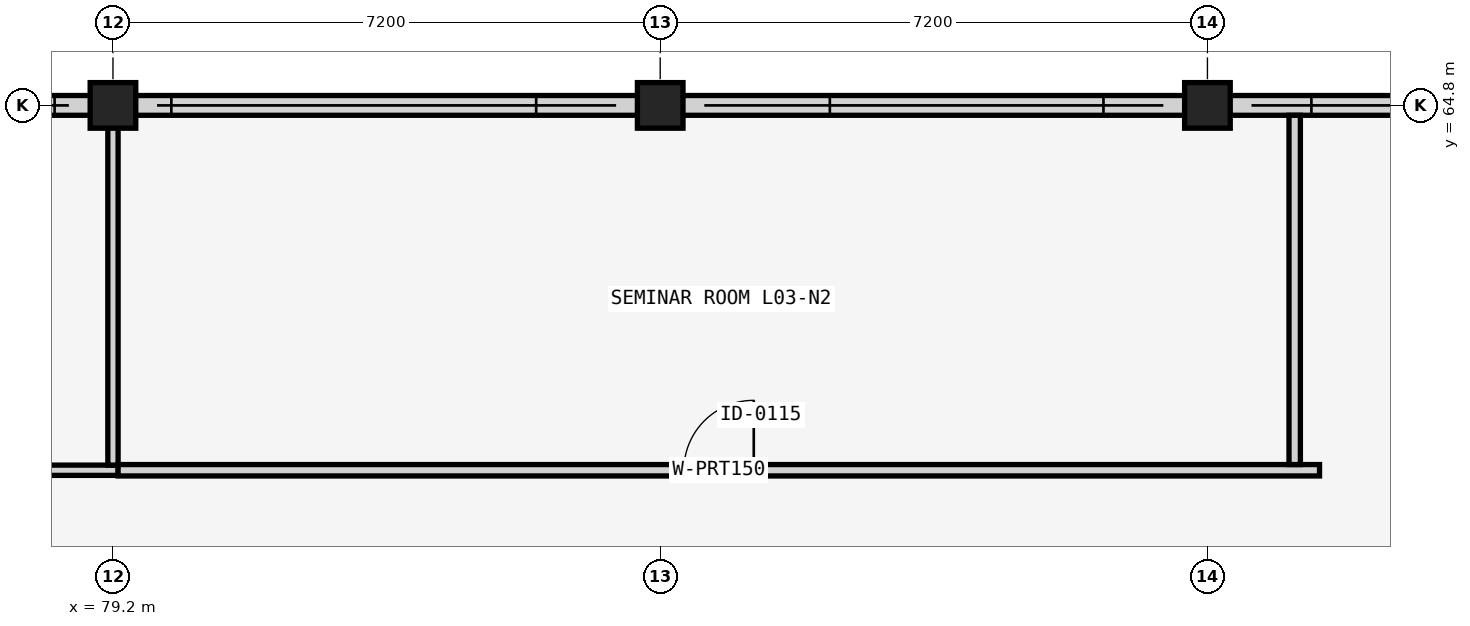
"""IFC4 building model, lengths in metres.
Left out: names, types, materials, properties, quantities, classifications, styles, units other than length and angle.
Written with IfcOpenShell. Run it as: python <this file> out.ifc"""

import sys

from ifc_helpers import new_model, si_unit, direction, frame, frame_2d, origin, origin_2d, place, context, subcontext, project, spatial, rectangle, extrude, element, fill, save


model = new_model("IFC4")
c1 = context("Model", 3, precision=1e-05, world=origin(), true_north=direction((0.0, 1.0)))
c2 = subcontext(c1, "Body", "Model", "MODEL_VIEW")
j1 = project(units=[si_unit("LENGTHUNIT", "METRE"), si_unit("PLANEANGLEUNIT", "RADIAN")], contexts=[c1])
p1 = place(None, origin())
s1 = spatial("IfcSite", under=j1, at=p1, CompositionType="ELEMENT")
p2 = place(p1, origin())
s2 = spatial("IfcBuilding", under=s1, at=p2, CompositionType="ELEMENT")
p3 = place(p2, frame((0.0, 0.0, 13.12)))
s3 = spatial("IfcBuildingStorey", under=s2, at=p3, CompositionType="ELEMENT", Elevation=13.12)
for number, where, z_axis, x_axis in (
    (1, (79.2, 64.8, 0.0), (0.0, 0.0, 1.0), (1.0, 0.0, 0.0)),
    (2, (86.4, 64.8, 0.0), (0.0, 0.0, 1.0), (1.0, 0.0, 0.0)),
    (3, (93.6, 64.8, 0.0), (0.0, 0.0, 1.0), (1.0, 0.0, 0.0)),
):
    element("IfcColumn", number, at=place(p3, frame(where, z_axis=z_axis, x_axis=x_axis)), inside=s3, PredefinedType="COLUMN", context=c2, shape_type="SweptSolid", body=[
        extrude(rectangle(XDim=0.6, YDim=0.6, at=origin_2d()), origin(), (0.0, 0.0, 1.0), 4.16),
    ])
p4 = place(p3, frame((72.0, 64.8, 4.16), z_axis=(0.0, 0.0, 1.0), x_axis=(1.0, 0.0, 0.0)))
e4 = element("IfcWall", 4, at=p4, inside=s3, PredefinedType="SOLIDWALL", context=c2, shape_type="SweptSolid", body=[
    extrude(rectangle(XDim=14.4, YDim=0.26, at=frame_2d((7.2, 0.0))), origin(), (0.0, 0.0, 1.0), 3.99),
])
p5 = place(p4, frame((1.632, 0.0, 0.4)))
e5 = element("IfcOpeningElement", 5, at=p5, cuts=e4, PredefinedType="OPENING", context=c2, shape_type="SweptSolid", body=[
    extrude(rectangle(XDim=4.8, YDim=2.6, at=frame_2d((2.4, 1.3))), frame((0.0, 0.14, 0.0), z_axis=(0.0, -1.0, 0.0), x_axis=(1.0, 0.0, 0.0)), (0.0, 0.0, 1.0), 0.28),
])
p6 = place(p4, frame((7.968, 0.0, 0.4)))
e6 = element("IfcOpeningElement", 6, at=p6, cuts=e4, PredefinedType="OPENING", context=c2, shape_type="SweptSolid", body=[
    extrude(rectangle(XDim=4.8, YDim=2.6, at=frame_2d((2.4, 1.3))), frame((0.0, 0.14, 0.0), z_axis=(0.0, -1.0, 0.0), x_axis=(1.0, 0.0, 0.0)), (0.0, 0.0, 1.0), 0.28),
])
p7 = place(p3, frame((86.4, 64.8, 4.16), z_axis=(0.0, 0.0, 1.0), x_axis=(1.0, 0.0, 0.0)))
e7 = element("IfcWall", 7, at=p7, inside=s3, PredefinedType="SOLIDWALL", context=c2, shape_type="SweptSolid", body=[
    extrude(rectangle(XDim=14.4, YDim=0.26, at=frame_2d((7.2, 0.0))), origin(), (0.0, 0.0, 1.0), 3.99),
])
p8 = place(p7, frame((2.232, 0.0, 0.4)))
e8 = element("IfcOpeningElement", 8, at=p8, cuts=e7, PredefinedType="OPENING", context=c2, shape_type="SweptSolid", body=[
    extrude(rectangle(XDim=3.6, YDim=2.4, at=frame_2d((1.8, 1.2))), frame((0.0, 0.14, 0.0), z_axis=(0.0, -1.0, 0.0), x_axis=(1.0, 0.0, 0.0)), (0.0, 0.0, 1.0), 0.28),
])
p9 = place(p7, frame((8.568, 0.0, 0.4)))
e9 = element("IfcOpeningElement", 9, at=p9, cuts=e7, PredefinedType="OPENING", context=c2, shape_type="SweptSolid", body=[
    extrude(rectangle(XDim=3.6, YDim=2.4, at=frame_2d((1.8, 1.2))), frame((0.0, 0.14, 0.0), z_axis=(0.0, -1.0, 0.0), x_axis=(1.0, 0.0, 0.0)), (0.0, 0.0, 1.0), 0.28),
])
p10 = place(p3, frame((43.133, 60.0, 0.0), z_axis=(0.0, 0.0, 1.0), x_axis=(1.0, 0.0, 0.0)))
e10 = element("IfcWall", 10, at=p10, inside=s3, PredefinedType="PARTITIONING", context=c2, shape_type="SweptSolid", body=[
    extrude(rectangle(XDim=36.135, YDim=0.135, at=frame_2d((18.067, 0.0))), origin(), (0.0, 0.0, 1.0), 3.16),
])
p11 = place(p10, frame((17.268, 0.0, 0.0)))
e11 = element("IfcOpeningElement", 11, at=p11, cuts=e10, PredefinedType="OPENING", context=c2, shape_type="SweptSolid", body=[
    extrude(rectangle(XDim=1.6, YDim=2.25, at=frame_2d((0.8, 1.125))), frame((0.0, 0.078, 0.0), z_axis=(0.0, -1.0, 0.0), x_axis=(1.0, 0.0, 0.0)), (0.0, 0.0, 1.0), 0.155),
])
p12 = place(p3, frame((79.2, 60.067, 0.0), z_axis=(0.0, 0.0, 1.0), x_axis=(0.0, 1.0, 0.0)))
e12 = element("IfcWall", 12, at=p12, inside=s3, PredefinedType="PARTITIONING", context=c2, shape_type="SweptSolid", body=[
    extrude(rectangle(XDim=4.603, YDim=0.135, at=frame_2d((2.301, 0.0))), origin(), (0.0, 0.0, 1.0), 3.81),
])
p13 = place(p3, frame((79.268, 60.0, 0.0), z_axis=(0.0, 0.0, 1.0), x_axis=(1.0, 0.0, 0.0)))
e13 = element("IfcWall", 13, at=p13, inside=s3, PredefinedType="PARTITIONING", context=c2, shape_type="SweptSolid", body=[
    extrude(rectangle(XDim=15.807, YDim=0.15, at=frame_2d((7.904, 0.0))), origin(), (0.0, 0.0, 1.0), 3.16),
])
p14 = place(p13, frame((7.444, 0.0, 0.0)))
e14 = element("IfcOpeningElement", 14, at=p14, cuts=e13, PredefinedType="OPENING", context=c2, shape_type="SweptSolid", body=[
    extrude(rectangle(XDim=0.92, YDim=2.1, at=frame_2d((0.46, 1.05))), frame((0.0, 0.085, 0.0), z_axis=(0.0, -1.0, 0.0), x_axis=(1.0, 0.0, 0.0)), (0.0, 0.0, 1.0), 0.17),
])
p15 = place(p3, frame((94.748, 60.075, 0.0), z_axis=(0.0, 0.0, 1.0), x_axis=(0.0, 1.0, 0.0)))
e15 = element("IfcWall", 15, at=p15, inside=s3, PredefinedType="PARTITIONING", context=c2, shape_type="SweptSolid", body=[
    extrude(rectangle(XDim=4.595, YDim=0.15, at=frame_2d((2.297, 0.0))), origin(), (0.0, 0.0, 1.0), 3.81),
])
p16 = place(p5, origin())
e16 = element("IfcWindow", 16, at=p16, inside=s3, PartitioningType="SINGLE_PANEL", PredefinedType="SKYLIGHT", context=c2, shape_type="SweptSolid", body=[
    extrude(rectangle(XDim=4.8, YDim=2.6, at=frame_2d((2.4, 1.3))), frame((0.0, 0.03, 0.0), z_axis=(0.0, -1.0, 0.0), x_axis=(1.0, 0.0, 0.0)), (0.0, 0.0, 1.0), 0.06),
])
fill(e5, e16)
p17 = place(p6, origin())
e17 = element("IfcWindow", 17, at=p17, inside=s3, PartitioningType="SINGLE_PANEL", PredefinedType="SKYLIGHT", context=c2, shape_type="SweptSolid", body=[
    extrude(rectangle(XDim=4.8, YDim=2.6, at=frame_2d((2.4, 1.3))), frame((0.0, 0.03, 0.0), z_axis=(0.0, -1.0, 0.0), x_axis=(1.0, 0.0, 0.0)), (0.0, 0.0, 1.0), 0.06),
])
fill(e6, e17)
p18 = place(p8, origin())
e18 = element("IfcWindow", 18, at=p18, inside=s3, PartitioningType="SINGLE_PANEL", PredefinedType="SKYLIGHT", context=c2, shape_type="SweptSolid", body=[
    extrude(rectangle(XDim=3.6, YDim=2.4, at=frame_2d((1.8, 1.2))), frame((0.0, 0.03, 0.0), z_axis=(0.0, -1.0, 0.0), x_axis=(1.0, 0.0, 0.0)), (0.0, 0.0, 1.0), 0.06),
])
fill(e8, e18)
p19 = place(p9, origin())
e19 = element("IfcWindow", 19, at=p19, inside=s3, PartitioningType="SINGLE_PANEL", PredefinedType="SKYLIGHT", context=c2, shape_type="SweptSolid", body=[
    extrude(rectangle(XDim=3.6, YDim=2.4, at=frame_2d((1.8, 1.2))), frame((0.0, 0.03, 0.0), z_axis=(0.0, -1.0, 0.0), x_axis=(1.0, 0.0, 0.0)), (0.0, 0.0, 1.0), 0.06),
])
fill(e9, e19)
p20 = place(p14, origin())
e20 = element("IfcDoor", 20, at=p20, inside=s3, OperationType="SINGLE_SWING_RIGHT", PredefinedType="DOOR", context=c2, shape_type="SweptSolid", body=[
    extrude(rectangle(XDim=0.92, YDim=2.1, at=frame_2d((0.46, 1.05))), frame((0.0, 0.025, 0.0), z_axis=(0.0, -1.0, 0.0), x_axis=(1.0, 0.0, 0.0)), (0.0, 0.0, 1.0), 0.05),
])
fill(e14, e20)
save(model, sys.argv[1])
